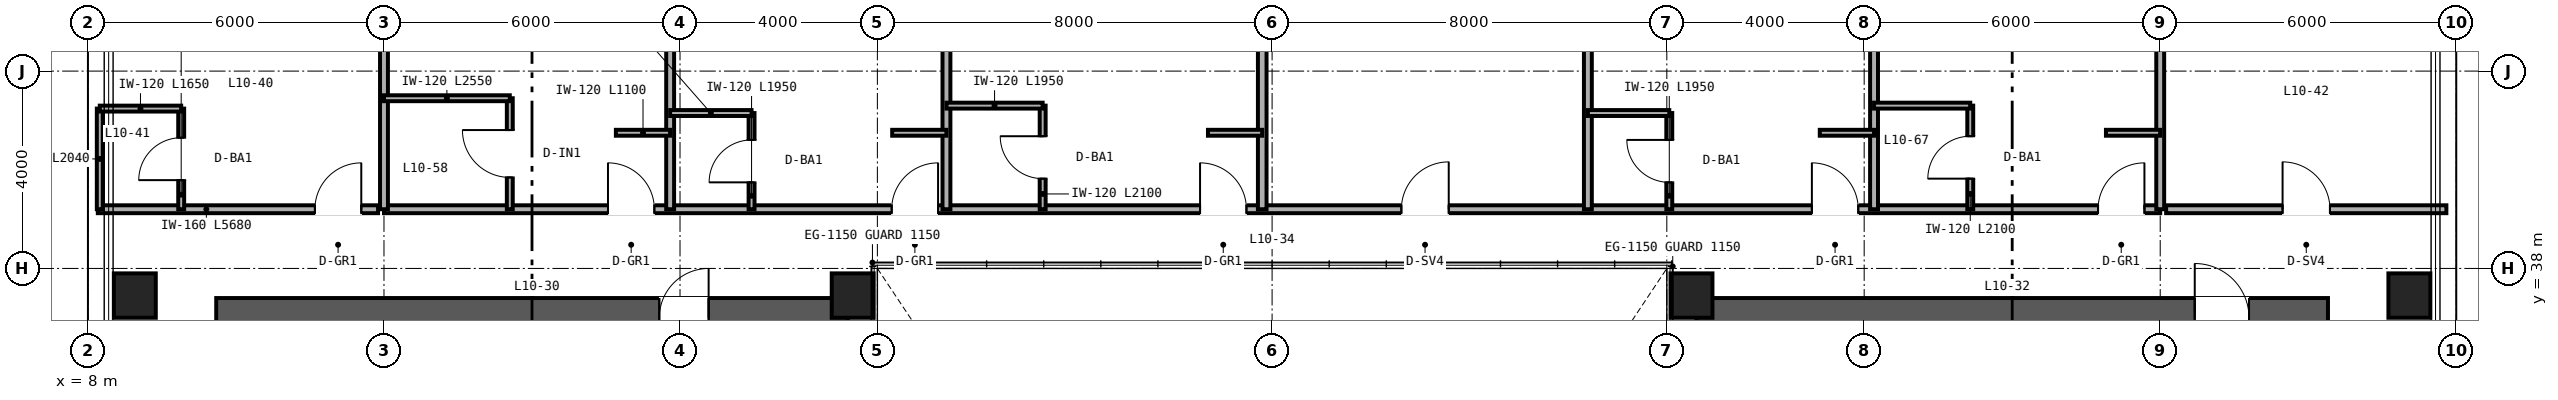
"""IFC4 building model, lengths in metres.
Left out: names, types, materials, properties, quantities, classifications, styles, units other than length and angle.
Written with IfcOpenShell. Run it as: python <this file> out.ifc"""

import sys

from ifc_helpers import new_model, si_unit, direction, frame, frame_2d, origin, origin_2d, place, context, subcontext, project, spatial, rectangle, hollow_rectangle, extrude, source, transform, mapped, element, fill, save


model = new_model("IFC4")
c1 = context("Model", 3, precision=1e-05, world=origin(), true_north=direction((0.0, 1.0)))
c2 = subcontext(c1, "Body", "Model", "MODEL_VIEW")
j1 = project(units=[si_unit("LENGTHUNIT", "METRE"), si_unit("PLANEANGLEUNIT", "RADIAN")], contexts=[c1])
p1 = place(None, origin())
s1 = spatial("IfcSite", under=j1, at=p1, CompositionType="ELEMENT")
p2 = place(p1, origin())
s2 = spatial("IfcBuilding", under=s1, at=p2, CompositionType="ELEMENT")
p3 = place(p2, frame((0.0, 0.0, 45.6)))
s3 = spatial("IfcBuildingStorey", under=s2, at=p3, CompositionType="ELEMENT", Elevation=45.6)
p4 = place(p3, frame((10.6, 37.0, 0.0), z_axis=(0.0, 0.0, 1.0), x_axis=(1.0, 0.0, 0.0)))
e1 = element("IfcWall", 1, at=p4, inside=s3, PredefinedType="SHEAR", context=c2, shape_type="SweptSolid", body=[
    extrude(rectangle(XDim=12.8, YDim=0.8, at=frame_2d((6.4, 0.0))), origin(), (0.0, 0.0, 1.0), 3.35),
])
p5 = place(p4, frame((8.98, 0.0, 0.0)))
e2 = element("IfcOpeningElement", 2, at=p5, cuts=e1, PredefinedType="OPENING", context=c2, shape_type="SweptSolid", body=[
    extrude(rectangle(XDim=1.0, YDim=2.15, at=frame_2d((0.5, 1.075))), frame((0.0, 0.41, 0.0), z_axis=(0.0, -1.0, 0.0), x_axis=(1.0, 0.0, 0.0)), (0.0, 0.0, 1.0), 0.82),
])
p6 = place(p3, frame((40.6, 37.0, 0.0), z_axis=(0.0, 0.0, 1.0), x_axis=(1.0, 0.0, 0.0)))
e3 = element("IfcWall", 3, at=p6, inside=s3, PredefinedType="SHEAR", context=c2, shape_type="SweptSolid", body=[
    extrude(rectangle(XDim=12.8, YDim=0.8, at=frame_2d((6.4, 0.0))), origin(), (0.0, 0.0, 1.0), 3.35),
])
p7 = place(p6, frame((10.1, 0.0, 0.0)))
e4 = element("IfcOpeningElement", 4, at=p7, cuts=e3, PredefinedType="OPENING", context=c2, shape_type="SweptSolid", body=[
    extrude(rectangle(XDim=1.1, YDim=2.15, at=frame_2d((0.55, 1.075))), frame((0.0, 0.41, 0.0), z_axis=(0.0, -1.0, 0.0), x_axis=(1.0, 0.0, 0.0)), (0.0, 0.0, 1.0), 0.82),
])
m1 = source(origin(), c2, "Body", "SweptSolid", [
    extrude(hollow_rectangle(XDim=0.85, YDim=0.9, WallThickness=0.04, at=origin_2d()), origin(), (0.0, 0.0, 1.0), 3.35),
])
for number, where, z_axis, x_axis in (
    (5, (8.95, 37.45, 0.0), (0.0, 0.0, 1.0), (1.0, 0.0, 0.0)),
    (6, (23.5, 37.45, 0.0), (0.0, 0.0, 1.0), (1.0, 0.0, 0.0)),
    (7, (40.5, 37.45, 0.0), (0.0, 0.0, 1.0), (1.0, 0.0, 0.0)),
    (8, (55.05, 37.45, 0.0), (0.0, 0.0, 1.0), (1.0, 0.0, 0.0)),
):
    element("IfcColumn", number, at=place(p3, frame(where, z_axis=z_axis, x_axis=x_axis)), inside=s3, PredefinedType="COLUMN", context=c2, shape_type="MappedRepresentation", body=[
        mapped(m1, transform((0.0, 0.0, 0.0), scale=1.0)),
    ])
p8 = place(p3, frame((8.2, 39.2, 0.0), z_axis=(0.0, 0.0, 1.0), x_axis=(1.0, 0.0, 0.0)))
e9 = element("IfcWall", 9, at=p8, inside=s3, PredefinedType="PARTITIONING", context=c2, shape_type="SweptSolid", body=[
    extrude(rectangle(XDim=5.68, YDim=0.16, at=frame_2d((2.84, 0.0))), origin(), (0.0, 0.0, 1.0), 3.35),
])
p9 = place(p8, frame((4.4, 0.0, 0.0)))
e10 = element("IfcOpeningElement", 10, at=p9, cuts=e9, PredefinedType="OPENING", context=c2, shape_type="SweptSolid", body=[
    extrude(rectangle(XDim=0.94, YDim=2.15, at=frame_2d((0.47, 1.075))), frame((0.0, 0.09, 0.0), z_axis=(0.0, -1.0, 0.0), x_axis=(1.0, 0.0, 0.0)), (0.0, 0.0, 1.0), 0.18),
])
p10 = place(p3, frame((9.89, 39.2, 0.0), z_axis=(0.0, 0.0, 1.0), x_axis=(0.0, 1.0, 0.0)))
e11 = element("IfcWall", 11, at=p10, inside=s3, PredefinedType="PARTITIONING", context=c2, shape_type="SweptSolid", body=[
    extrude(rectangle(XDim=2.04, YDim=0.12, at=frame_2d((1.02, 0.0))), origin(), (0.0, 0.0, 1.0), 3.35),
])
p11 = place(p10, frame((0.59, 0.0, 0.0)))
e12 = element("IfcOpeningElement", 12, at=p11, cuts=e11, PredefinedType="OPENING", context=c2, shape_type="SweptSolid", body=[
    extrude(rectangle(XDim=0.86, YDim=2.1, at=frame_2d((0.43, 1.05))), frame((0.0, 0.07, 0.0), z_axis=(0.0, -1.0, 0.0), x_axis=(1.0, 0.0, 0.0)), (0.0, 0.0, 1.0), 0.14),
])
p12 = place(p3, frame((8.24, 39.2, 0.0), z_axis=(0.0, 0.0, 1.0), x_axis=(0.0, 1.0, 0.0)))
e13 = element("IfcWall", 13, at=p12, inside=s3, PredefinedType="PARTITIONING", context=c2, shape_type="SweptSolid", body=[
    extrude(rectangle(XDim=2.04, YDim=0.12, at=frame_2d((1.02, 0.0))), origin(), (0.0, 0.0, 1.0), 3.35),
])
p13 = place(p3, frame((8.24, 41.24, 0.0), z_axis=(0.0, 0.0, 1.0), x_axis=(1.0, 0.0, 0.0)))
e14 = element("IfcWall", 14, at=p13, inside=s3, PredefinedType="PARTITIONING", context=c2, shape_type="SweptSolid", body=[
    extrude(rectangle(XDim=1.65, YDim=0.12, at=frame_2d((0.825, 0.0))), origin(), (0.0, 0.0, 1.0), 3.35),
])
p14 = place(p3, frame((50.12, 39.2, 0.0), z_axis=(0.0, 0.0, 1.0), x_axis=(1.0, 0.0, 0.0)))
e15 = element("IfcWall", 15, at=p14, inside=s3, PredefinedType="PARTITIONING", context=c2, shape_type="SweptSolid", body=[
    extrude(rectangle(XDim=5.68, YDim=0.16, at=frame_2d((2.84, 0.0))), origin(), (0.0, 0.0, 1.0), 3.35),
])
p15 = place(p14, frame((2.36, 0.0, 0.0)))
e16 = element("IfcOpeningElement", 16, at=p15, cuts=e15, PredefinedType="OPENING", context=c2, shape_type="SweptSolid", body=[
    extrude(rectangle(XDim=0.96, YDim=2.15, at=frame_2d((0.48, 1.075))), frame((0.0, 0.09, 0.0), z_axis=(0.0, -1.0, 0.0), x_axis=(1.0, 0.0, 0.0)), (0.0, 0.0, 1.0), 0.18),
])
p16 = place(p3, frame((14.0, 39.2, 0.0), z_axis=(0.0, 0.0, 1.0), x_axis=(1.0, 0.0, 0.0)))
e17 = element("IfcWall", 17, at=p16, inside=s3, PredefinedType="PARTITIONING", context=c2, shape_type="SweptSolid", body=[
    extrude(rectangle(XDim=36.0, YDim=0.16, at=frame_2d((18.0, 0.0))), origin(), (0.0, 0.0, 1.0), 2.571),
])
p17 = place(p16, frame((4.54, 0.0, 0.0)))
e18 = element("IfcOpeningElement", 18, at=p17, cuts=e17, PredefinedType="OPENING", context=c2, shape_type="SweptSolid", body=[
    extrude(rectangle(XDim=0.94, YDim=2.15, at=frame_2d((0.47, 1.075))), frame((0.0, 0.09, 0.0), z_axis=(0.0, -1.0, 0.0), x_axis=(1.0, 0.0, 0.0)), (0.0, 0.0, 1.0), 0.18),
])
p18 = place(p16, frame((10.29, 0.0, 0.0)))
e19 = element("IfcOpeningElement", 19, at=p18, cuts=e17, PredefinedType="OPENING", context=c2, shape_type="SweptSolid", body=[
    extrude(rectangle(XDim=0.94, YDim=2.15, at=frame_2d((0.47, 1.075))), frame((0.0, 0.09, 0.0), z_axis=(0.0, -1.0, 0.0), x_axis=(1.0, 0.0, 0.0)), (0.0, 0.0, 1.0), 0.18),
])
p19 = place(p16, frame((16.54, 0.0, 0.0)))
e20 = element("IfcOpeningElement", 20, at=p19, cuts=e17, PredefinedType="OPENING", context=c2, shape_type="SweptSolid", body=[
    extrude(rectangle(XDim=0.94, YDim=2.15, at=frame_2d((0.47, 1.075))), frame((0.0, 0.09, 0.0), z_axis=(0.0, -1.0, 0.0), x_axis=(1.0, 0.0, 0.0)), (0.0, 0.0, 1.0), 0.18),
])
p20 = place(p16, frame((20.62, 0.0, 0.0)))
e21 = element("IfcOpeningElement", 21, at=p20, cuts=e17, PredefinedType="OPENING", context=c2, shape_type="SweptSolid", body=[
    extrude(rectangle(XDim=0.96, YDim=2.15, at=frame_2d((0.48, 1.075))), frame((0.0, 0.09, 0.0), z_axis=(0.0, -1.0, 0.0), x_axis=(1.0, 0.0, 0.0)), (0.0, 0.0, 1.0), 0.18),
])
p21 = place(p16, frame((28.94, 0.0, 0.0)))
e22 = element("IfcOpeningElement", 22, at=p21, cuts=e17, PredefinedType="OPENING", context=c2, shape_type="SweptSolid", body=[
    extrude(rectangle(XDim=0.94, YDim=2.15, at=frame_2d((0.47, 1.075))), frame((0.0, 0.09, 0.0), z_axis=(0.0, -1.0, 0.0), x_axis=(1.0, 0.0, 0.0)), (0.0, 0.0, 1.0), 0.18),
])
p22 = place(p16, frame((34.74, 0.0, 0.0)))
e23 = element("IfcOpeningElement", 23, at=p22, cuts=e17, PredefinedType="OPENING", context=c2, shape_type="SweptSolid", body=[
    extrude(rectangle(XDim=0.94, YDim=2.15, at=frame_2d((0.47, 1.075))), frame((0.0, 0.09, 0.0), z_axis=(0.0, -1.0, 0.0), x_axis=(1.0, 0.0, 0.0)), (0.0, 0.0, 1.0), 0.18),
])
for number, where, z_axis, x_axis in (
    (24, (14.0, 39.2, 0.0), (0.0, 0.0, 1.0), (0.0, 1.0, 0.0)),
    (25, (50.0, 39.2, 0.0), (0.0, 0.0, 1.0), (0.0, 1.0, 0.0)),
    (26, (19.8, 39.2, 0.0), (0.0, 0.0, 1.0), (0.0, 1.0, 0.0)),
):
    element("IfcWall", number, at=place(p3, frame(where, z_axis=z_axis, x_axis=x_axis)), inside=s3, PredefinedType="PARTITIONING", context=c2, shape_type="SweptSolid", body=[
        extrude(rectangle(XDim=10.44, YDim=0.16, at=frame_2d((5.22, 0.0))), origin(), (0.0, 0.0, 1.0), 2.657),
    ])
p23 = place(p3, frame((16.55, 39.2, 0.0), z_axis=(0.0, 0.0, 1.0), x_axis=(0.0, 1.0, 0.0)))
e27 = element("IfcWall", 27, at=p23, inside=s3, PredefinedType="PARTITIONING", context=c2, shape_type="SweptSolid", body=[
    extrude(rectangle(XDim=2.25, YDim=0.12, at=frame_2d((1.125, 0.0))), origin(), (0.0, 0.0, 1.0), 3.35),
])
p24 = place(p23, frame((0.645, 0.0, 0.0)))
e28 = element("IfcOpeningElement", 28, at=p24, cuts=e27, PredefinedType="OPENING", context=c2, shape_type="SweptSolid", body=[
    extrude(rectangle(XDim=0.96, YDim=2.15, at=frame_2d((0.48, 1.075))), frame((0.0, 0.07, 0.0), z_axis=(0.0, -1.0, 0.0), x_axis=(1.0, 0.0, 0.0)), (0.0, 0.0, 1.0), 0.14),
])
p25 = place(p3, frame((14.0, 41.45, 0.0), z_axis=(0.0, 0.0, 1.0), x_axis=(1.0, 0.0, 0.0)))
e29 = element("IfcWall", 29, at=p25, inside=s3, PredefinedType="PARTITIONING", context=c2, shape_type="SweptSolid", body=[
    extrude(rectangle(XDim=2.55, YDim=0.12, at=frame_2d((1.275, 0.0))), origin(), (0.0, 0.0, 1.0), 3.35),
])
p26 = place(p3, frame((18.7, 40.75, 0.0), z_axis=(0.0, 0.0, 1.0), x_axis=(1.0, 0.0, 0.0)))
e30 = element("IfcWall", 30, at=p26, inside=s3, PredefinedType="PARTITIONING", context=c2, shape_type="SweptSolid", body=[
    extrude(rectangle(XDim=1.1, YDim=0.12, at=frame_2d((0.55, 0.0))), origin(), (0.0, 0.0, 1.0), 3.35),
])
p27 = place(p3, frame((25.4, 39.2, 0.0), z_axis=(0.0, 0.0, 1.0), x_axis=(0.0, 1.0, 0.0)))
e31 = element("IfcWall", 31, at=p27, inside=s3, PredefinedType="PARTITIONING", context=c2, shape_type="SweptSolid", body=[
    extrude(rectangle(XDim=10.44, YDim=0.16, at=frame_2d((5.22, 0.0))), origin(), (0.0, 0.0, 1.0), 2.423),
])
p28 = place(p3, frame((21.45, 39.2, 0.0), z_axis=(0.0, 0.0, 1.0), x_axis=(0.0, 1.0, 0.0)))
e32 = element("IfcWall", 32, at=p28, inside=s3, PredefinedType="PARTITIONING", context=c2, shape_type="SweptSolid", body=[
    extrude(rectangle(XDim=1.95, YDim=0.12, at=frame_2d((0.975, 0.0))), origin(), (0.0, 0.0, 1.0), 3.35),
])
p29 = place(p28, frame((0.545, 0.0, 0.0)))
e33 = element("IfcOpeningElement", 33, at=p29, cuts=e32, PredefinedType="OPENING", context=c2, shape_type="SweptSolid", body=[
    extrude(rectangle(XDim=0.86, YDim=2.1, at=frame_2d((0.43, 1.05))), frame((0.0, 0.07, 0.0), z_axis=(0.0, -1.0, 0.0), x_axis=(1.0, 0.0, 0.0)), (0.0, 0.0, 1.0), 0.14),
])
p30 = place(p3, frame((19.8, 41.15, 0.0), z_axis=(0.0, 0.0, 1.0), x_axis=(1.0, 0.0, 0.0)))
e34 = element("IfcWall", 34, at=p30, inside=s3, PredefinedType="PARTITIONING", context=c2, shape_type="SweptSolid", body=[
    extrude(rectangle(XDim=1.65, YDim=0.12, at=frame_2d((0.825, 0.0))), origin(), (0.0, 0.0, 1.0), 3.35),
])
p31 = place(p3, frame((24.3, 40.75, 0.0), z_axis=(0.0, 0.0, 1.0), x_axis=(1.0, 0.0, 0.0)))
e35 = element("IfcWall", 35, at=p31, inside=s3, PredefinedType="PARTITIONING", context=c2, shape_type="SweptSolid", body=[
    extrude(rectangle(XDim=1.1, YDim=0.12, at=frame_2d((0.55, 0.0))), origin(), (0.0, 0.0, 1.0), 3.35),
])
p32 = place(p3, frame((31.8, 39.2, 0.0), z_axis=(0.0, 0.0, 1.0), x_axis=(0.0, 1.0, 0.0)))
e36 = element("IfcWall", 36, at=p32, inside=s3, PredefinedType="PARTITIONING", context=c2, shape_type="SweptSolid", body=[
    extrude(rectangle(XDim=10.44, YDim=0.175, at=frame_2d((5.22, 0.0))), origin(), (0.0, 0.0, 1.0), 2.423),
])
p33 = place(p3, frame((27.35, 39.2, 0.0), z_axis=(0.0, 0.0, 1.0), x_axis=(0.0, 1.0, 0.0)))
e37 = element("IfcWall", 37, at=p33, inside=s3, PredefinedType="PARTITIONING", context=c2, shape_type="SweptSolid", body=[
    extrude(rectangle(XDim=2.1, YDim=0.12, at=frame_2d((1.05, 0.0))), origin(), (0.0, 0.0, 1.0), 3.35),
])
p34 = place(p33, frame((0.62, 0.0, 0.0)))
e38 = element("IfcOpeningElement", 38, at=p34, cuts=e37, PredefinedType="OPENING", context=c2, shape_type="SweptSolid", body=[
    extrude(rectangle(XDim=0.86, YDim=2.1, at=frame_2d((0.43, 1.05))), frame((0.0, 0.07, 0.0), z_axis=(0.0, -1.0, 0.0), x_axis=(1.0, 0.0, 0.0)), (0.0, 0.0, 1.0), 0.14),
])
p35 = place(p3, frame((25.4, 41.3, 0.0), z_axis=(0.0, 0.0, 1.0), x_axis=(1.0, 0.0, 0.0)))
e39 = element("IfcWall", 39, at=p35, inside=s3, PredefinedType="PARTITIONING", context=c2, shape_type="SweptSolid", body=[
    extrude(rectangle(XDim=1.95, YDim=0.12, at=frame_2d((0.975, 0.0))), origin(), (0.0, 0.0, 1.0), 3.35),
])
p36 = place(p3, frame((30.7, 40.75, 0.0), z_axis=(0.0, 0.0, 1.0), x_axis=(1.0, 0.0, 0.0)))
e40 = element("IfcWall", 40, at=p36, inside=s3, PredefinedType="PARTITIONING", context=c2, shape_type="SweptSolid", body=[
    extrude(rectangle(XDim=1.1, YDim=0.12, at=frame_2d((0.55, 0.0))), origin(), (0.0, 0.0, 1.0), 3.35),
])
p37 = place(p3, frame((38.4, 39.2, 0.0), z_axis=(0.0, 0.0, 1.0), x_axis=(0.0, 1.0, 0.0)))
e41 = element("IfcWall", 41, at=p37, inside=s3, PredefinedType="PARTITIONING", context=c2, shape_type="SweptSolid", body=[
    extrude(rectangle(XDim=10.44, YDim=0.16, at=frame_2d((5.22, 0.0))), origin(), (0.0, 0.0, 1.0), 2.423),
])
p38 = place(p3, frame((44.2, 39.2, 0.0), z_axis=(0.0, 0.0, 1.0), x_axis=(0.0, 1.0, 0.0)))
e42 = element("IfcWall", 42, at=p38, inside=s3, PredefinedType="PARTITIONING", context=c2, shape_type="SweptSolid", body=[
    extrude(rectangle(XDim=10.44, YDim=0.16, at=frame_2d((5.22, 0.0))), origin(), (0.0, 0.0, 1.0), 2.657),
])
p39 = place(p3, frame((40.05, 39.2, 0.0), z_axis=(0.0, 0.0, 1.0), x_axis=(0.0, 1.0, 0.0)))
e43 = element("IfcWall", 43, at=p39, inside=s3, PredefinedType="PARTITIONING", context=c2, shape_type="SweptSolid", body=[
    extrude(rectangle(XDim=1.95, YDim=0.12, at=frame_2d((0.975, 0.0))), origin(), (0.0, 0.0, 1.0), 3.35),
])
p40 = place(p39, frame((0.545, 0.0, 0.0)))
e44 = element("IfcOpeningElement", 44, at=p40, cuts=e43, PredefinedType="OPENING", context=c2, shape_type="SweptSolid", body=[
    extrude(rectangle(XDim=0.86, YDim=2.1, at=frame_2d((0.43, 1.05))), frame((0.0, 0.07, 0.0), z_axis=(0.0, -1.0, 0.0), x_axis=(1.0, 0.0, 0.0)), (0.0, 0.0, 1.0), 0.14),
])
p41 = place(p3, frame((38.4, 41.15, 0.0), z_axis=(0.0, 0.0, 1.0), x_axis=(1.0, 0.0, 0.0)))
e45 = element("IfcWall", 45, at=p41, inside=s3, PredefinedType="PARTITIONING", context=c2, shape_type="SweptSolid", body=[
    extrude(rectangle(XDim=1.65, YDim=0.12, at=frame_2d((0.825, 0.0))), origin(), (0.0, 0.0, 1.0), 3.35),
])
p42 = place(p3, frame((43.1, 40.75, 0.0), z_axis=(0.0, 0.0, 1.0), x_axis=(1.0, 0.0, 0.0)))
e46 = element("IfcWall", 46, at=p42, inside=s3, PredefinedType="PARTITIONING", context=c2, shape_type="SweptSolid", body=[
    extrude(rectangle(XDim=1.1, YDim=0.12, at=frame_2d((0.55, 0.0))), origin(), (0.0, 0.0, 1.0), 3.35),
])
p43 = place(p3, frame((46.15, 39.2, 0.0), z_axis=(0.0, 0.0, 1.0), x_axis=(0.0, 1.0, 0.0)))
e47 = element("IfcWall", 47, at=p43, inside=s3, PredefinedType="PARTITIONING", context=c2, shape_type="SweptSolid", body=[
    extrude(rectangle(XDim=2.1, YDim=0.12, at=frame_2d((1.05, 0.0))), origin(), (0.0, 0.0, 1.0), 3.35),
])
p44 = place(p43, frame((0.62, 0.0, 0.0)))
e48 = element("IfcOpeningElement", 48, at=p44, cuts=e47, PredefinedType="OPENING", context=c2, shape_type="SweptSolid", body=[
    extrude(rectangle(XDim=0.86, YDim=2.1, at=frame_2d((0.43, 1.05))), frame((0.0, 0.07, 0.0), z_axis=(0.0, -1.0, 0.0), x_axis=(1.0, 0.0, 0.0)), (0.0, 0.0, 1.0), 0.14),
])
p45 = place(p3, frame((44.2, 41.3, 0.0), z_axis=(0.0, 0.0, 1.0), x_axis=(1.0, 0.0, 0.0)))
e49 = element("IfcWall", 49, at=p45, inside=s3, PredefinedType="PARTITIONING", context=c2, shape_type="SweptSolid", body=[
    extrude(rectangle(XDim=1.95, YDim=0.12, at=frame_2d((0.975, 0.0))), origin(), (0.0, 0.0, 1.0), 3.35),
])
p46 = place(p3, frame((48.9, 40.75, 0.0), z_axis=(0.0, 0.0, 1.0), x_axis=(1.0, 0.0, 0.0)))
e50 = element("IfcWall", 50, at=p46, inside=s3, PredefinedType="PARTITIONING", context=c2, shape_type="SweptSolid", body=[
    extrude(rectangle(XDim=1.1, YDim=0.12, at=frame_2d((0.55, 0.0))), origin(), (0.0, 0.0, 1.0), 3.35),
])
m2 = source(origin(), c2, "Body", "SweptSolid", [
    extrude(rectangle(XDim=1.0, YDim=2.15, at=frame_2d((0.5, 1.075))), frame((0.0, 0.025, 0.0), z_axis=(0.0, -1.0, 0.0), x_axis=(1.0, 0.0, 0.0)), (0.0, 0.0, 1.0), 0.05),
])
p47 = place(p5, origin())
e51 = element("IfcDoor", 51, at=p47, inside=s3, OperationType="SINGLE_SWING_RIGHT", PredefinedType="DOOR", context=c2, shape_type="MappedRepresentation", body=[
    mapped(m2, transform((0.0, 0.0, 0.0), scale=1.0)),
])
fill(e2, e51)
m3 = source(origin(), c2, "Body", "SweptSolid", [
    extrude(rectangle(XDim=1.1, YDim=2.15, at=frame_2d((0.55, 1.075))), frame((0.0, 0.025, 0.0), z_axis=(0.0, -1.0, 0.0), x_axis=(1.0, 0.0, 0.0)), (0.0, 0.0, 1.0), 0.05),
])
p48 = place(p7, origin())
e52 = element("IfcDoor", 52, at=p48, inside=s3, OperationType="SINGLE_SWING_LEFT", PredefinedType="DOOR", context=c2, shape_type="MappedRepresentation", body=[
    mapped(m3, transform((0.0, 0.0, 0.0), scale=1.0)),
])
fill(e4, e52)
m4 = source(origin(), c2, "Body", "SweptSolid", [
    extrude(rectangle(XDim=0.86, YDim=2.1, at=frame_2d((0.43, 1.05))), frame((0.0, 0.025, 0.0), z_axis=(0.0, -1.0, 0.0), x_axis=(1.0, 0.0, 0.0)), (0.0, 0.0, 1.0), 0.05),
])
p49 = place(p11, origin())
e53 = element("IfcDoor", 53, at=p49, inside=s3, OperationType="SINGLE_SWING_LEFT", PredefinedType="DOOR", context=c2, shape_type="MappedRepresentation", body=[
    mapped(m4, transform((0.0, 0.0, 0.0), scale=1.0)),
])
fill(e12, e53)
m5 = source(origin(), c2, "Body", "SweptSolid", [
    extrude(rectangle(XDim=0.94, YDim=2.15, at=frame_2d((0.47, 1.075))), frame((0.0, 0.025, 0.0), z_axis=(0.0, -1.0, 0.0), x_axis=(1.0, 0.0, 0.0)), (0.0, 0.0, 1.0), 0.05),
])
p50 = place(p9, origin())
e54 = element("IfcDoor", 54, at=p50, inside=s3, OperationType="SINGLE_SWING_RIGHT", PredefinedType="DOOR", context=c2, shape_type="MappedRepresentation", body=[
    mapped(m5, transform((0.0, 0.0, 0.0), scale=1.0)),
])
fill(e10, e54)
m6 = source(origin(), c2, "Body", "SweptSolid", [
    extrude(rectangle(XDim=0.96, YDim=2.15, at=frame_2d((0.48, 1.075))), frame((0.0, 0.025, 0.0), z_axis=(0.0, -1.0, 0.0), x_axis=(1.0, 0.0, 0.0)), (0.0, 0.0, 1.0), 0.05),
])
p51 = place(p15, origin())
e55 = element("IfcDoor", 55, at=p51, inside=s3, OperationType="SINGLE_SWING_LEFT", PredefinedType="DOOR", context=c2, shape_type="MappedRepresentation", body=[
    mapped(m6, transform((0.0, 0.0, 0.0), scale=1.0)),
])
fill(e16, e55)
p52 = place(p24, origin())
e56 = element("IfcDoor", 56, at=p52, inside=s3, OperationType="SINGLE_SWING_RIGHT", PredefinedType="DOOR", context=c2, shape_type="MappedRepresentation", body=[
    mapped(m6, transform((0.0, 0.0, 0.0), scale=1.0)),
])
fill(e28, e56)
p53 = place(p29, origin())
e57 = element("IfcDoor", 57, at=p53, inside=s3, OperationType="SINGLE_SWING_LEFT", PredefinedType="DOOR", context=c2, shape_type="MappedRepresentation", body=[
    mapped(m4, transform((0.0, 0.0, 0.0), scale=1.0)),
])
fill(e33, e57)
p54 = place(p34, origin())
e58 = element("IfcDoor", 58, at=p54, inside=s3, OperationType="SINGLE_SWING_RIGHT", PredefinedType="DOOR", context=c2, shape_type="MappedRepresentation", body=[
    mapped(m4, transform((0.0, 0.0, 0.0), scale=1.0)),
])
fill(e38, e58)
p55 = place(p40, origin())
e59 = element("IfcDoor", 59, at=p55, inside=s3, OperationType="SINGLE_SWING_RIGHT", PredefinedType="DOOR", context=c2, shape_type="MappedRepresentation", body=[
    mapped(m4, transform((0.0, 0.0, 0.0), scale=1.0)),
])
fill(e44, e59)
p56 = place(p44, origin())
e60 = element("IfcDoor", 60, at=p56, inside=s3, OperationType="SINGLE_SWING_LEFT", PredefinedType="DOOR", context=c2, shape_type="MappedRepresentation", body=[
    mapped(m4, transform((0.0, 0.0, 0.0), scale=1.0)),
])
fill(e48, e60)
p57 = place(p17, origin())
e61 = element("IfcDoor", 61, at=p57, inside=s3, OperationType="SINGLE_SWING_LEFT", PredefinedType="DOOR", context=c2, shape_type="MappedRepresentation", body=[
    mapped(m5, transform((0.0, 0.0, 0.0), scale=1.0)),
])
fill(e18, e61)
p58 = place(p18, origin())
e62 = element("IfcDoor", 62, at=p58, inside=s3, OperationType="SINGLE_SWING_RIGHT", PredefinedType="DOOR", context=c2, shape_type="MappedRepresentation", body=[
    mapped(m5, transform((0.0, 0.0, 0.0), scale=1.0)),
])
fill(e19, e62)
p59 = place(p19, origin())
e63 = element("IfcDoor", 63, at=p59, inside=s3, OperationType="SINGLE_SWING_LEFT", PredefinedType="DOOR", context=c2, shape_type="MappedRepresentation", body=[
    mapped(m5, transform((0.0, 0.0, 0.0), scale=1.0)),
])
fill(e20, e63)
p60 = place(p20, origin())
e64 = element("IfcDoor", 64, at=p60, inside=s3, OperationType="SINGLE_SWING_RIGHT", PredefinedType="DOOR", context=c2, shape_type="MappedRepresentation", body=[
    mapped(m6, transform((0.0, 0.0, 0.0), scale=1.0)),
])
fill(e21, e64)
p61 = place(p21, origin())
e65 = element("IfcDoor", 65, at=p61, inside=s3, OperationType="SINGLE_SWING_LEFT", PredefinedType="DOOR", context=c2, shape_type="MappedRepresentation", body=[
    mapped(m5, transform((0.0, 0.0, 0.0), scale=1.0)),
])
fill(e22, e65)
p62 = place(p22, origin())
e66 = element("IfcDoor", 66, at=p62, inside=s3, OperationType="SINGLE_SWING_RIGHT", PredefinedType="DOOR", context=c2, shape_type="MappedRepresentation", body=[
    mapped(m5, transform((0.0, 0.0, 0.0), scale=1.0)),
])
fill(e23, e66)
save(model, sys.argv[1])
